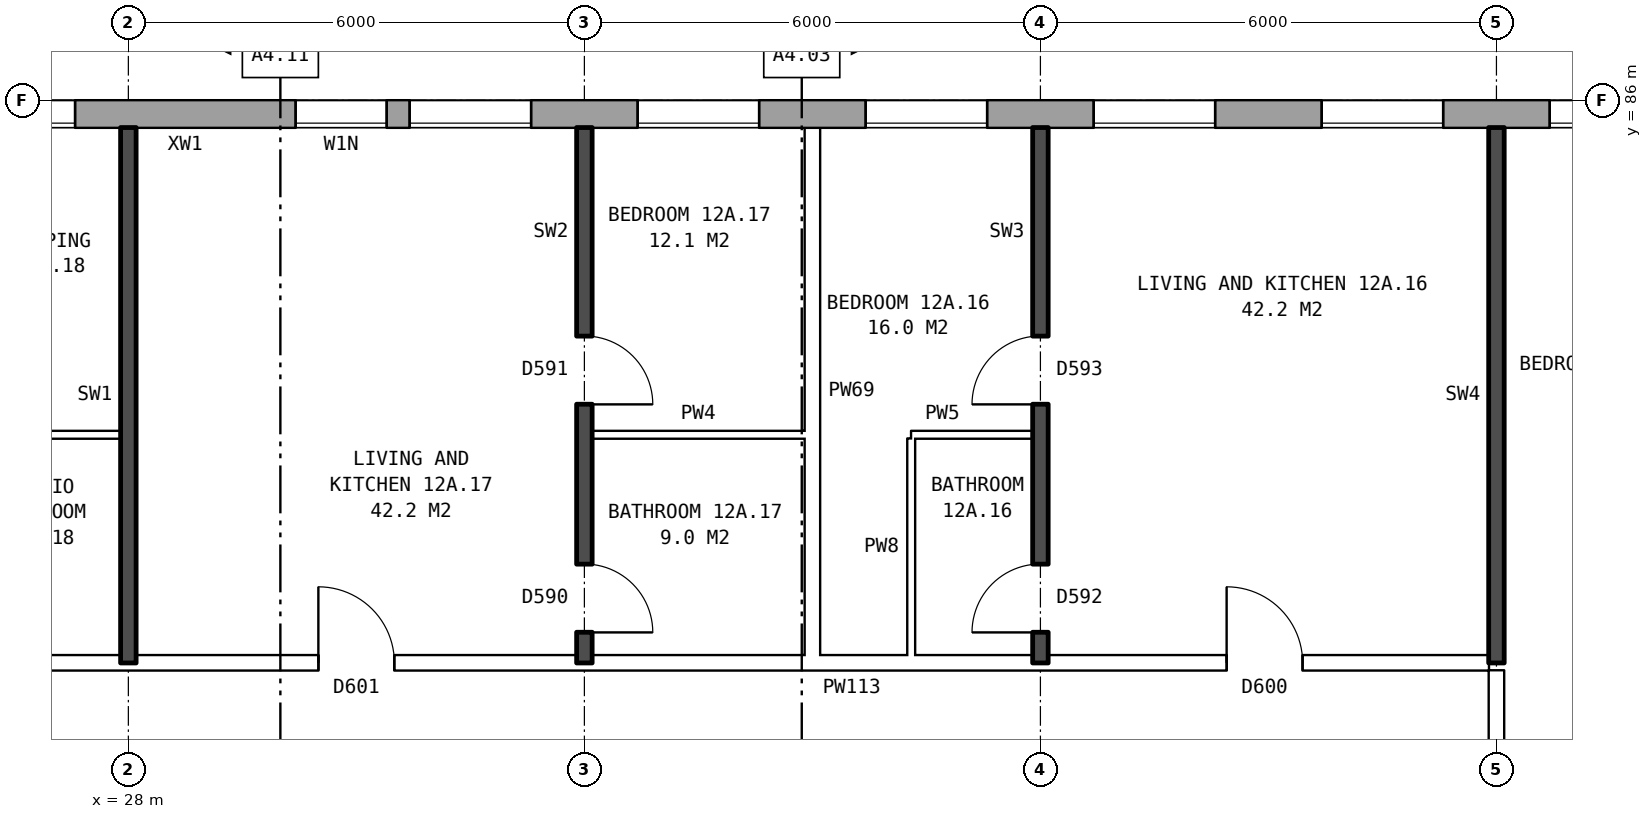
"""IFC4 building model, lengths in metres.
Left out: names, types, materials, properties, quantities, classifications, styles, units other than length and angle.
Written with IfcOpenShell. Run it as: python <this file> out.ifc"""

import sys

from ifc_helpers import new_model, si_unit, direction, frame, frame_2d, origin, place, context, subcontext, project, spatial, rectangle, extrude, element, fill, save


model = new_model("IFC4")
c1 = context("Model", 3, precision=1e-05, world=origin(), true_north=direction((0.0, 1.0)))
c2 = subcontext(c1, "Body", "Model", "MODEL_VIEW")
j1 = project(units=[si_unit("LENGTHUNIT", "METRE"), si_unit("PLANEANGLEUNIT", "RADIAN")], contexts=[c1])
p1 = place(None, origin())
s1 = spatial("IfcSite", under=j1, at=p1, CompositionType="ELEMENT")
p2 = place(p1, origin())
s2 = spatial("IfcBuilding", under=s1, at=p2, CompositionType="ELEMENT")
p3 = place(p2, frame((0.0, 0.0, 47.4)))
s3 = spatial("IfcBuildingStorey", under=s2, at=p3, CompositionType="ELEMENT", Elevation=47.4)
p4 = place(p3, frame((72.925, 85.82, 0.0), z_axis=(0.0, 0.0, 1.0), x_axis=(-1.0, 0.0, 0.0)))
e1 = element("IfcWall", 1, at=p4, inside=s3, PredefinedType="STANDARD", context=c2, shape_type="SweptSolid", body=[
    extrude(rectangle(XDim=48.351, YDim=0.36, at=frame_2d((24.175, 0.0))), origin(), (0.0, 0.0, 1.0), 2.85),
])
p5 = place(p4, frame((0.625, 0.0, 0.8)))
e2 = element("IfcOpeningElement", 2, at=p5, cuts=e1, PredefinedType="OPENING", context=c2, shape_type="SweptSolid", body=[
    extrude(rectangle(XDim=1.6, YDim=1.8, at=frame_2d((0.8, 0.9))), frame((0.0, 0.19, 0.0), z_axis=(0.0, -1.0, 0.0), x_axis=(1.0, 0.0, 0.0)), (0.0, 0.0, 1.0), 0.38),
])
p6 = place(p4, frame((3.125, 0.0, 1.7)))
e3 = element("IfcOpeningElement", 3, at=p6, cuts=e1, PredefinedType="OPENING", context=c2, shape_type="SweptSolid", body=[
    extrude(rectangle(XDim=0.6, YDim=0.9, at=frame_2d((0.3, 0.45))), frame((0.0, 0.19, 0.0), z_axis=(0.0, -1.0, 0.0), x_axis=(1.0, 0.0, 0.0)), (0.0, 0.0, 1.0), 0.38),
])
p7 = place(p4, frame((6.625, 0.0, 0.8)))
e4 = element("IfcOpeningElement", 4, at=p7, cuts=e1, PredefinedType="OPENING", context=c2, shape_type="SweptSolid", body=[
    extrude(rectangle(XDim=1.6, YDim=1.8, at=frame_2d((0.8, 0.9))), frame((0.0, 0.19, 0.0), z_axis=(0.0, -1.0, 0.0), x_axis=(1.0, 0.0, 0.0)), (0.0, 0.0, 1.0), 0.38),
])
p8 = place(p4, frame((9.625, 0.0, 0.8)))
e5 = element("IfcOpeningElement", 5, at=p8, cuts=e1, PredefinedType="OPENING", context=c2, shape_type="SweptSolid", body=[
    extrude(rectangle(XDim=1.6, YDim=1.8, at=frame_2d((0.8, 0.9))), frame((0.0, 0.19, 0.0), z_axis=(0.0, -1.0, 0.0), x_axis=(1.0, 0.0, 0.0)), (0.0, 0.0, 1.0), 0.38),
])
p9 = place(p4, frame((12.625, 0.0, 0.8)))
e6 = element("IfcOpeningElement", 6, at=p9, cuts=e1, PredefinedType="OPENING", context=c2, shape_type="SweptSolid", body=[
    extrude(rectangle(XDim=1.6, YDim=1.8, at=frame_2d((0.8, 0.9))), frame((0.0, 0.19, 0.0), z_axis=(0.0, -1.0, 0.0), x_axis=(1.0, 0.0, 0.0)), (0.0, 0.0, 1.0), 0.38),
])
p10 = place(p4, frame((15.625, 0.0, 0.8)))
e7 = element("IfcOpeningElement", 7, at=p10, cuts=e1, PredefinedType="OPENING", context=c2, shape_type="SweptSolid", body=[
    extrude(rectangle(XDim=1.6, YDim=1.8, at=frame_2d((0.8, 0.9))), frame((0.0, 0.19, 0.0), z_axis=(0.0, -1.0, 0.0), x_axis=(1.0, 0.0, 0.0)), (0.0, 0.0, 1.0), 0.38),
])
p11 = place(p4, frame((18.625, 0.0, 0.8)))
e8 = element("IfcOpeningElement", 8, at=p11, cuts=e1, PredefinedType="OPENING", context=c2, shape_type="SweptSolid", body=[
    extrude(rectangle(XDim=1.6, YDim=1.8, at=frame_2d((0.8, 0.9))), frame((0.0, 0.19, 0.0), z_axis=(0.0, -1.0, 0.0), x_axis=(1.0, 0.0, 0.0)), (0.0, 0.0, 1.0), 0.38),
])
p12 = place(p4, frame((21.625, 0.0, 0.8)))
e9 = element("IfcOpeningElement", 9, at=p12, cuts=e1, PredefinedType="OPENING", context=c2, shape_type="SweptSolid", body=[
    extrude(rectangle(XDim=1.6, YDim=1.8, at=frame_2d((0.8, 0.9))), frame((0.0, 0.19, 0.0), z_axis=(0.0, -1.0, 0.0), x_axis=(1.0, 0.0, 0.0)), (0.0, 0.0, 1.0), 0.38),
])
p13 = place(p4, frame((24.625, 0.0, 0.8)))
e10 = element("IfcOpeningElement", 10, at=p13, cuts=e1, PredefinedType="OPENING", context=c2, shape_type="SweptSolid", body=[
    extrude(rectangle(XDim=1.6, YDim=1.8, at=frame_2d((0.8, 0.9))), frame((0.0, 0.19, 0.0), z_axis=(0.0, -1.0, 0.0), x_axis=(1.0, 0.0, 0.0)), (0.0, 0.0, 1.0), 0.38),
])
p14 = place(p4, frame((27.625, 0.0, 0.8)))
e11 = element("IfcOpeningElement", 11, at=p14, cuts=e1, PredefinedType="OPENING", context=c2, shape_type="SweptSolid", body=[
    extrude(rectangle(XDim=1.6, YDim=1.8, at=frame_2d((0.8, 0.9))), frame((0.0, 0.19, 0.0), z_axis=(0.0, -1.0, 0.0), x_axis=(1.0, 0.0, 0.0)), (0.0, 0.0, 1.0), 0.38),
])
p15 = place(p4, frame((30.625, 0.0, 0.8)))
e12 = element("IfcOpeningElement", 12, at=p15, cuts=e1, PredefinedType="OPENING", context=c2, shape_type="SweptSolid", body=[
    extrude(rectangle(XDim=1.6, YDim=1.8, at=frame_2d((0.8, 0.9))), frame((0.0, 0.19, 0.0), z_axis=(0.0, -1.0, 0.0), x_axis=(1.0, 0.0, 0.0)), (0.0, 0.0, 1.0), 0.38),
])
p16 = place(p4, frame((33.625, 0.0, 0.8)))
e13 = element("IfcOpeningElement", 13, at=p16, cuts=e1, PredefinedType="OPENING", context=c2, shape_type="SweptSolid", body=[
    extrude(rectangle(XDim=1.6, YDim=1.8, at=frame_2d((0.8, 0.9))), frame((0.0, 0.19, 0.0), z_axis=(0.0, -1.0, 0.0), x_axis=(1.0, 0.0, 0.0)), (0.0, 0.0, 1.0), 0.38),
])
p17 = place(p4, frame((36.625, 0.0, 0.8)))
e14 = element("IfcOpeningElement", 14, at=p17, cuts=e1, PredefinedType="OPENING", context=c2, shape_type="SweptSolid", body=[
    extrude(rectangle(XDim=1.6, YDim=1.8, at=frame_2d((0.8, 0.9))), frame((0.0, 0.19, 0.0), z_axis=(0.0, -1.0, 0.0), x_axis=(1.0, 0.0, 0.0)), (0.0, 0.0, 1.0), 0.38),
])
p18 = place(p4, frame((39.625, 0.0, 0.8)))
e15 = element("IfcOpeningElement", 15, at=p18, cuts=e1, PredefinedType="OPENING", context=c2, shape_type="SweptSolid", body=[
    extrude(rectangle(XDim=1.6, YDim=1.8, at=frame_2d((0.8, 0.9))), frame((0.0, 0.19, 0.0), z_axis=(0.0, -1.0, 0.0), x_axis=(1.0, 0.0, 0.0)), (0.0, 0.0, 1.0), 0.38),
])
p19 = place(p4, frame((41.525, 0.0, 0.8)))
e16 = element("IfcOpeningElement", 16, at=p19, cuts=e1, PredefinedType="OPENING", context=c2, shape_type="SweptSolid", body=[
    extrude(rectangle(XDim=1.2, YDim=1.2, at=frame_2d((0.6, 0.6))), frame((0.0, 0.19, 0.0), z_axis=(0.0, -1.0, 0.0), x_axis=(1.0, 0.0, 0.0)), (0.0, 0.0, 1.0), 0.38),
])
p20 = place(p4, frame((45.625, 0.0, 0.8)))
e17 = element("IfcOpeningElement", 17, at=p20, cuts=e1, PredefinedType="OPENING", context=c2, shape_type="SweptSolid", body=[
    extrude(rectangle(XDim=1.6, YDim=1.8, at=frame_2d((0.8, 0.9))), frame((0.0, 0.19, 0.0), z_axis=(0.0, -1.0, 0.0), x_axis=(1.0, 0.0, 0.0)), (0.0, 0.0, 1.0), 0.38),
])
p21 = place(p4, frame((5.225, 0.0, 0.8)))
e18 = element("IfcOpeningElement", 18, at=p21, cuts=e1, PredefinedType="OPENING", context=c2, shape_type="SweptSolid", body=[
    extrude(rectangle(XDim=1.0, YDim=0.9, at=frame_2d((0.5, 0.45))), frame((0.0, 0.19, 0.0), z_axis=(0.0, -1.0, 0.0), x_axis=(1.0, 0.0, 0.0)), (0.0, 0.0, 1.0), 0.38),
])
p22 = place(p3, frame((21.86, 78.6, 0.0), z_axis=(0.0, 0.0, 1.0), x_axis=(1.0, 0.0, 0.0)))
e19 = element("IfcWall", 19, at=p22, inside=s3, PredefinedType="PARTITIONING", context=c2, shape_type="SweptSolid", body=[
    extrude(rectangle(XDim=24.04, YDim=0.2, at=frame_2d((12.02, 0.0))), origin(), (0.0, 0.0, 1.0), 2.85),
])
p23 = place(p22, frame((20.59, 0.0, 0.0)))
e20 = element("IfcOpeningElement", 20, at=p23, cuts=e19, PredefinedType="OPENING", context=c2, shape_type="SweptSolid", body=[
    extrude(rectangle(XDim=1.0, YDim=2.1, at=frame_2d((0.5, 1.05))), frame((0.0, 0.11, 0.0), z_axis=(0.0, -1.0, 0.0), x_axis=(1.0, 0.0, 0.0)), (0.0, 0.0, 1.0), 0.22),
])
p24 = place(p22, frame((8.64, 0.0, 0.0)))
e21 = element("IfcOpeningElement", 21, at=p24, cuts=e19, PredefinedType="OPENING", context=c2, shape_type="SweptSolid", body=[
    extrude(rectangle(XDim=1.0, YDim=2.1, at=frame_2d((0.5, 1.05))), frame((0.0, 0.11, 0.0), z_axis=(0.0, -1.0, 0.0), x_axis=(1.0, 0.0, 0.0)), (0.0, 0.0, 1.0), 0.22),
])
p25 = place(p22, frame((1.37, 0.0, 0.0)))
e22 = element("IfcOpeningElement", 22, at=p25, cuts=e19, PredefinedType="OPENING", context=c2, shape_type="SweptSolid", body=[
    extrude(rectangle(XDim=1.0, YDim=2.1, at=frame_2d((0.5, 1.05))), frame((0.0, 0.11, 0.0), z_axis=(0.0, -1.0, 0.0), x_axis=(1.0, 0.0, 0.0)), (0.0, 0.0, 1.0), 0.22),
])
p26 = place(p3, frame((25.6, 81.6, 0.0), z_axis=(0.0, 0.0, 1.0), x_axis=(1.0, 0.0, 0.0)))
e23 = element("IfcWall", 23, at=p26, inside=s3, PredefinedType="PARTITIONING", context=c2, shape_type="SweptSolid", body=[
    extrude(rectangle(XDim=2.3, YDim=0.1, at=frame_2d((1.15, 0.0))), origin(), (0.0, 0.0, 1.0), 2.85),
])
p27 = place(p3, frame((34.1, 81.6, 0.0), z_axis=(0.0, 0.0, 1.0), x_axis=(1.0, 0.0, 0.0)))
e24 = element("IfcWall", 24, at=p27, inside=s3, PredefinedType="PARTITIONING", context=c2, shape_type="SweptSolid", body=[
    extrude(rectangle(XDim=2.8, YDim=0.1, at=frame_2d((1.4, 0.0))), origin(), (0.0, 0.0, 1.0), 2.85),
])
p28 = place(p3, frame((38.3, 81.6, 0.0), z_axis=(0.0, 0.0, 1.0), x_axis=(1.0, 0.0, 0.0)))
e25 = element("IfcWall", 25, at=p28, inside=s3, PredefinedType="PARTITIONING", context=c2, shape_type="SweptSolid", body=[
    extrude(rectangle(XDim=1.6, YDim=0.1, at=frame_2d((0.8, 0.0))), origin(), (0.0, 0.0, 1.0), 2.85),
])
p29 = place(p3, frame((28.0, 78.6, 0.0), z_axis=(0.0, 0.0, 1.0), x_axis=(0.0, 1.0, 0.0)))
e26 = element("IfcWall", 26, at=p29, inside=s3, PredefinedType="SOLIDWALL", context=c2, shape_type="SweptSolid", body=[
    extrude(rectangle(XDim=7.04, YDim=0.2, at=frame_2d((3.52, 0.0))), origin(), (0.0, 0.0, 1.0), 2.85),
])
p30 = place(p3, frame((34.0, 78.6, 0.0), z_axis=(0.0, 0.0, 1.0), x_axis=(0.0, 1.0, 0.0)))
e27 = element("IfcWall", 27, at=p30, inside=s3, PredefinedType="SOLIDWALL", context=c2, shape_type="SweptSolid", body=[
    extrude(rectangle(XDim=7.04, YDim=0.2, at=frame_2d((3.52, 0.0))), origin(), (0.0, 0.0, 1.0), 2.85),
])
p31 = place(p30, frame((3.4, 0.0, 0.0)))
e28 = element("IfcOpeningElement", 28, at=p31, cuts=e27, PredefinedType="OPENING", context=c2, shape_type="SweptSolid", body=[
    extrude(rectangle(XDim=0.9, YDim=2.1, at=frame_2d((0.45, 1.05))), frame((0.0, 0.11, 0.0), z_axis=(0.0, -1.0, 0.0), x_axis=(1.0, 0.0, 0.0)), (0.0, 0.0, 1.0), 0.22),
])
p32 = place(p30, frame((0.4, 0.0, 0.0)))
e29 = element("IfcOpeningElement", 29, at=p32, cuts=e27, PredefinedType="OPENING", context=c2, shape_type="SweptSolid", body=[
    extrude(rectangle(XDim=0.9, YDim=2.1, at=frame_2d((0.45, 1.05))), frame((0.0, 0.11, 0.0), z_axis=(0.0, -1.0, 0.0), x_axis=(1.0, 0.0, 0.0)), (0.0, 0.0, 1.0), 0.22),
])
p33 = place(p3, frame((37.0, 78.7, 0.0), z_axis=(0.0, 0.0, 1.0), x_axis=(0.0, 1.0, 0.0)))
e30 = element("IfcWall", 30, at=p33, inside=s3, PredefinedType="PARTITIONING", context=c2, shape_type="SweptSolid", body=[
    extrude(rectangle(XDim=6.94, YDim=0.2, at=frame_2d((3.47, 0.0))), origin(), (0.0, 0.0, 1.0), 2.85),
])
p34 = place(p3, frame((38.3, 78.7, 0.0), z_axis=(0.0, 0.0, 1.0), x_axis=(0.0, 1.0, 0.0)))
e31 = element("IfcWall", 31, at=p34, inside=s3, PredefinedType="PARTITIONING", context=c2, shape_type="SweptSolid", body=[
    extrude(rectangle(XDim=2.85, YDim=0.1, at=frame_2d((1.425, 0.0))), origin(), (0.0, 0.0, 1.0), 2.85),
])
p35 = place(p3, frame((40.0, 78.6, 0.0), z_axis=(0.0, 0.0, 1.0), x_axis=(0.0, 1.0, 0.0)))
e32 = element("IfcWall", 32, at=p35, inside=s3, PredefinedType="SOLIDWALL", context=c2, shape_type="SweptSolid", body=[
    extrude(rectangle(XDim=7.04, YDim=0.2, at=frame_2d((3.52, 0.0))), origin(), (0.0, 0.0, 1.0), 2.85),
])
p36 = place(p35, frame((3.4, 0.0, 0.0)))
e33 = element("IfcOpeningElement", 33, at=p36, cuts=e32, PredefinedType="OPENING", context=c2, shape_type="SweptSolid", body=[
    extrude(rectangle(XDim=0.9, YDim=2.1, at=frame_2d((0.45, 1.05))), frame((0.0, 0.11, 0.0), z_axis=(0.0, -1.0, 0.0), x_axis=(1.0, 0.0, 0.0)), (0.0, 0.0, 1.0), 0.22),
])
p37 = place(p35, frame((0.4, 0.0, 0.0)))
e34 = element("IfcOpeningElement", 34, at=p37, cuts=e32, PredefinedType="OPENING", context=c2, shape_type="SweptSolid", body=[
    extrude(rectangle(XDim=0.9, YDim=2.1, at=frame_2d((0.45, 1.05))), frame((0.0, 0.11, 0.0), z_axis=(0.0, -1.0, 0.0), x_axis=(1.0, 0.0, 0.0)), (0.0, 0.0, 1.0), 0.22),
])
p38 = place(p3, frame((46.0, 76.3, 0.0), z_axis=(0.0, 0.0, 1.0), x_axis=(0.0, 1.0, 0.0)))
e35 = element("IfcWall", 35, at=p38, inside=s3, PredefinedType="PARTITIONING", context=c2, shape_type="SweptSolid", body=[
    extrude(rectangle(XDim=2.2, YDim=0.2, at=frame_2d((1.1, 0.0))), origin(), (0.0, 0.0, 1.0), 2.85),
])
p39 = place(p3, frame((46.0, 78.6, 0.0), z_axis=(0.0, 0.0, 1.0), x_axis=(0.0, 1.0, 0.0)))
e36 = element("IfcWall", 36, at=p39, inside=s3, PredefinedType="SOLIDWALL", context=c2, shape_type="SweptSolid", body=[
    extrude(rectangle(XDim=7.04, YDim=0.2, at=frame_2d((3.52, 0.0))), origin(), (0.0, 0.0, 1.0), 2.85),
])
p40 = place(p13, origin())
e37 = element("IfcWindow", 37, at=p40, inside=s3, PartitioningType="SINGLE_PANEL", PredefinedType="WINDOW", context=c2, shape_type="SweptSolid", body=[
    extrude(rectangle(XDim=1.6, YDim=1.8, at=frame_2d((0.8, 0.9))), frame((0.0, 0.15, 0.0), z_axis=(0.0, -1.0, 0.0), x_axis=(1.0, 0.0, 0.0)), (0.0, 0.0, 1.0), 0.06),
])
fill(e10, e37)
p41 = place(p14, origin())
e38 = element("IfcWindow", 38, at=p41, inside=s3, PartitioningType="SINGLE_PANEL", PredefinedType="WINDOW", context=c2, shape_type="SweptSolid", body=[
    extrude(rectangle(XDim=1.6, YDim=1.8, at=frame_2d((0.8, 0.9))), frame((0.0, 0.15, 0.0), z_axis=(0.0, -1.0, 0.0), x_axis=(1.0, 0.0, 0.0)), (0.0, 0.0, 1.0), 0.06),
])
fill(e11, e38)
p42 = place(p15, origin())
e39 = element("IfcWindow", 39, at=p42, inside=s3, PartitioningType="SINGLE_PANEL", PredefinedType="WINDOW", context=c2, shape_type="SweptSolid", body=[
    extrude(rectangle(XDim=1.6, YDim=1.8, at=frame_2d((0.8, 0.9))), frame((0.0, 0.15, 0.0), z_axis=(0.0, -1.0, 0.0), x_axis=(1.0, 0.0, 0.0)), (0.0, 0.0, 1.0), 0.06),
])
fill(e12, e39)
p43 = place(p16, origin())
e40 = element("IfcWindow", 40, at=p43, inside=s3, PartitioningType="SINGLE_PANEL", PredefinedType="WINDOW", context=c2, shape_type="SweptSolid", body=[
    extrude(rectangle(XDim=1.6, YDim=1.8, at=frame_2d((0.8, 0.9))), frame((0.0, 0.15, 0.0), z_axis=(0.0, -1.0, 0.0), x_axis=(1.0, 0.0, 0.0)), (0.0, 0.0, 1.0), 0.06),
])
fill(e13, e40)
p44 = place(p17, origin())
e41 = element("IfcWindow", 41, at=p44, inside=s3, PartitioningType="SINGLE_PANEL", PredefinedType="WINDOW", context=c2, shape_type="SweptSolid", body=[
    extrude(rectangle(XDim=1.6, YDim=1.8, at=frame_2d((0.8, 0.9))), frame((0.0, 0.15, 0.0), z_axis=(0.0, -1.0, 0.0), x_axis=(1.0, 0.0, 0.0)), (0.0, 0.0, 1.0), 0.06),
])
fill(e14, e41)
p45 = place(p18, origin())
e42 = element("IfcWindow", 42, at=p45, inside=s3, PartitioningType="SINGLE_PANEL", PredefinedType="WINDOW", context=c2, shape_type="SweptSolid", body=[
    extrude(rectangle(XDim=1.6, YDim=1.8, at=frame_2d((0.8, 0.9))), frame((0.0, 0.15, 0.0), z_axis=(0.0, -1.0, 0.0), x_axis=(1.0, 0.0, 0.0)), (0.0, 0.0, 1.0), 0.06),
])
fill(e15, e42)
p46 = place(p19, origin())
e43 = element("IfcWindow", 43, at=p46, inside=s3, PartitioningType="SINGLE_PANEL", PredefinedType="WINDOW", context=c2, shape_type="SweptSolid", body=[
    extrude(rectangle(XDim=1.2, YDim=1.2, at=frame_2d((0.6, 0.6))), frame((0.0, 0.15, 0.0), z_axis=(0.0, -1.0, 0.0), x_axis=(1.0, 0.0, 0.0)), (0.0, 0.0, 1.0), 0.06),
])
fill(e16, e43)
p47 = place(p20, origin())
e44 = element("IfcWindow", 44, at=p47, inside=s3, PartitioningType="SINGLE_PANEL", PredefinedType="WINDOW", context=c2, shape_type="SweptSolid", body=[
    extrude(rectangle(XDim=1.6, YDim=1.8, at=frame_2d((0.8, 0.9))), frame((0.0, 0.15, 0.0), z_axis=(0.0, -1.0, 0.0), x_axis=(1.0, 0.0, 0.0)), (0.0, 0.0, 1.0), 0.06),
])
fill(e17, e44)
p48 = place(p36, origin())
e45 = element("IfcDoor", 45, at=p48, inside=s3, OperationType="SINGLE_SWING_LEFT", PredefinedType="DOOR", context=c2, shape_type="SweptSolid", body=[
    extrude(rectangle(XDim=0.9, YDim=2.1, at=frame_2d((0.45, 1.05))), frame((0.0, 0.025, 0.0), z_axis=(0.0, -1.0, 0.0), x_axis=(1.0, 0.0, 0.0)), (0.0, 0.0, 1.0), 0.05),
])
fill(e33, e45)
p49 = place(p23, origin())
e46 = element("IfcDoor", 46, at=p49, inside=s3, OperationType="SINGLE_SWING_LEFT", PredefinedType="DOOR", context=c2, shape_type="SweptSolid", body=[
    extrude(rectangle(XDim=1.0, YDim=2.1, at=frame_2d((0.5, 1.05))), frame((0.0, 0.025, 0.0), z_axis=(0.0, -1.0, 0.0), x_axis=(1.0, 0.0, 0.0)), (0.0, 0.0, 1.0), 0.05),
])
fill(e20, e46)
p50 = place(p37, origin())
e47 = element("IfcDoor", 47, at=p50, inside=s3, OperationType="SINGLE_SWING_LEFT", PredefinedType="DOOR", context=c2, shape_type="SweptSolid", body=[
    extrude(rectangle(XDim=0.9, YDim=2.1, at=frame_2d((0.45, 1.05))), frame((0.0, 0.025, 0.0), z_axis=(0.0, -1.0, 0.0), x_axis=(1.0, 0.0, 0.0)), (0.0, 0.0, 1.0), 0.05),
])
fill(e34, e47)
p51 = place(p31, frame((0.9, 0.0, 0.0), z_axis=(0.0, 0.0, 1.0), x_axis=(-1.0, 0.0, 0.0)))
e48 = element("IfcDoor", 48, at=p51, inside=s3, OperationType="SINGLE_SWING_RIGHT", PredefinedType="DOOR", context=c2, shape_type="SweptSolid", body=[
    extrude(rectangle(XDim=0.9, YDim=2.1, at=frame_2d((0.45, 1.05))), frame((0.0, 0.025, 0.0), z_axis=(0.0, -1.0, 0.0), x_axis=(1.0, 0.0, 0.0)), (0.0, 0.0, 1.0), 0.05),
])
fill(e28, e48)
p52 = place(p24, origin())
e49 = element("IfcDoor", 49, at=p52, inside=s3, OperationType="SINGLE_SWING_LEFT", PredefinedType="DOOR", context=c2, shape_type="SweptSolid", body=[
    extrude(rectangle(XDim=1.0, YDim=2.1, at=frame_2d((0.5, 1.05))), frame((0.0, 0.025, 0.0), z_axis=(0.0, -1.0, 0.0), x_axis=(1.0, 0.0, 0.0)), (0.0, 0.0, 1.0), 0.05),
])
fill(e21, e49)
p53 = place(p32, frame((0.9, 0.0, 0.0), z_axis=(0.0, 0.0, 1.0), x_axis=(-1.0, 0.0, 0.0)))
e50 = element("IfcDoor", 50, at=p53, inside=s3, OperationType="SINGLE_SWING_RIGHT", PredefinedType="DOOR", context=c2, shape_type="SweptSolid", body=[
    extrude(rectangle(XDim=0.9, YDim=2.1, at=frame_2d((0.45, 1.05))), frame((0.0, 0.025, 0.0), z_axis=(0.0, -1.0, 0.0), x_axis=(1.0, 0.0, 0.0)), (0.0, 0.0, 1.0), 0.05),
])
fill(e29, e50)
save(model, sys.argv[1])
